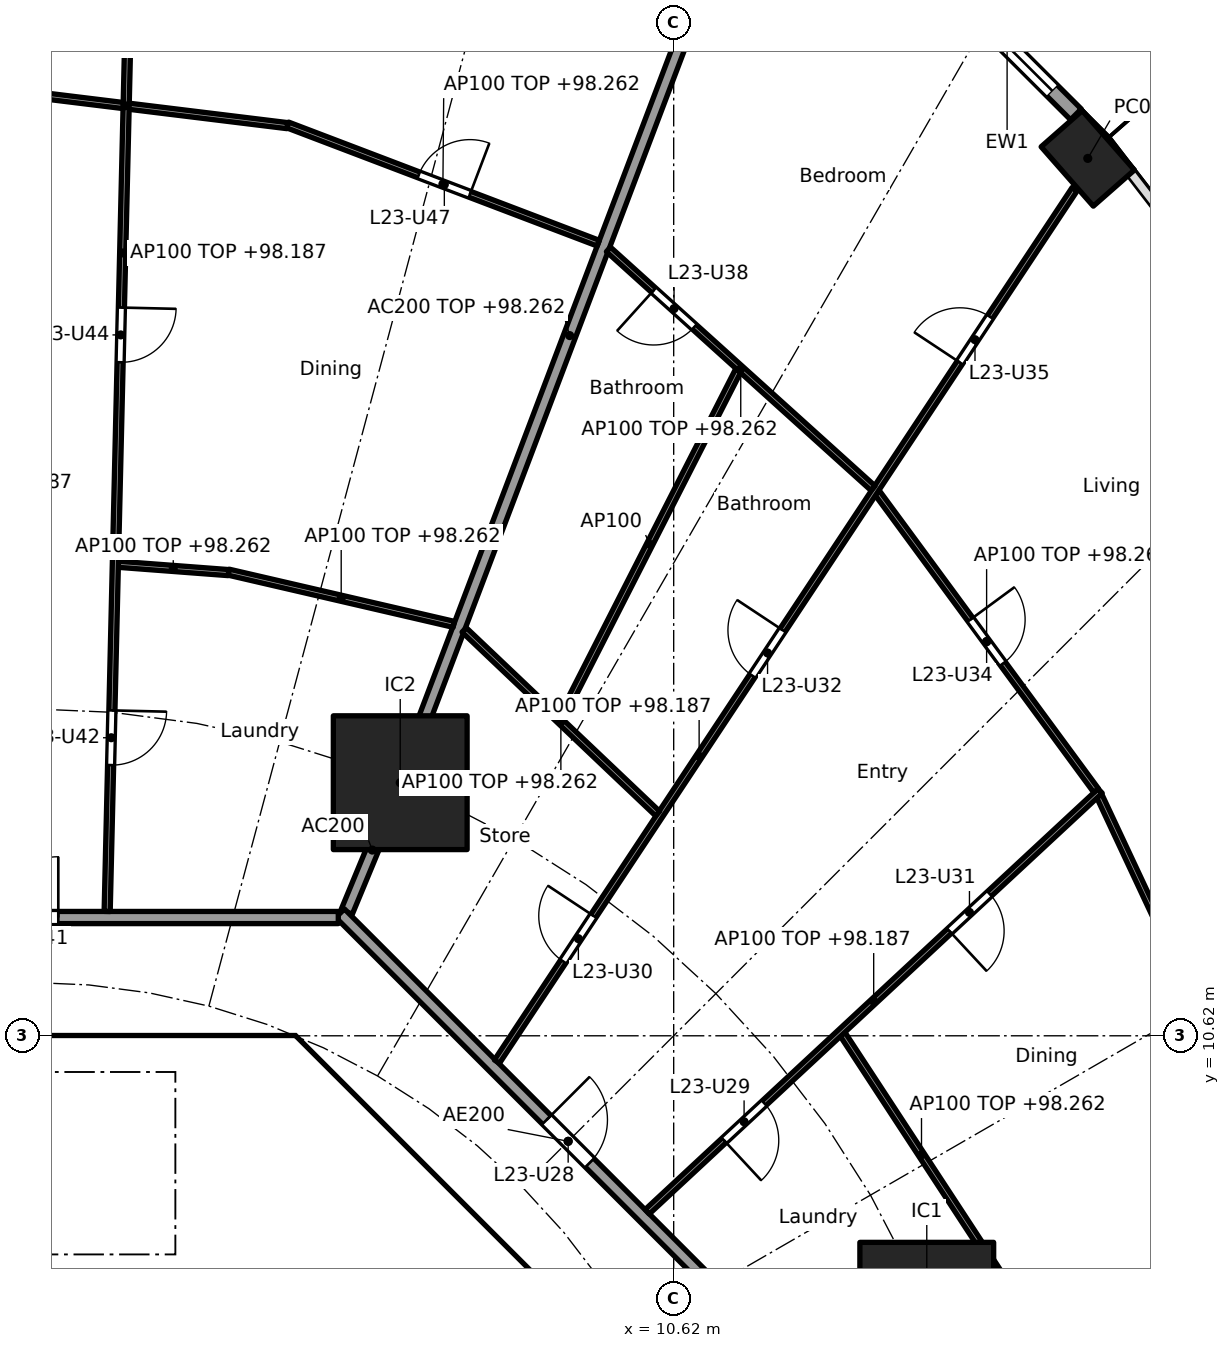
"""IFC4 building model, lengths in metres.
Left out: names, types, materials, properties, quantities, classifications, styles, units other than length and angle.
Written with IfcOpenShell. Run it as: python <this file> out.ifc"""

import sys

from ifc_helpers import new_model, si_unit, direction, frame, frame_2d, origin, origin_2d, place, context, subcontext, project, spatial, polyline, rectangle, hollow_rectangle, outline, extrude, element, fill, save


model = new_model("IFC4")
c1 = context("Model", 3, precision=1e-05, world=origin(), true_north=direction((0.0, 1.0)))
c2 = subcontext(c1, "Body", "Model", "MODEL_VIEW")
j1 = project(units=[si_unit("LENGTHUNIT", "METRE"), si_unit("PLANEANGLEUNIT", "RADIAN")], contexts=[c1])
p1 = place(None, origin())
s1 = spatial("IfcSite", under=j1, at=p1, CompositionType="ELEMENT")
p2 = place(p1, origin())
s2 = spatial("IfcBuilding", under=s1, at=p2, CompositionType="ELEMENT")
p3 = place(p2, frame((0.0, 0.0, 95.5)))
s3 = spatial("IfcBuildingStorey", under=s2, at=p3, CompositionType="ELEMENT", Elevation=95.5)
p4 = place(p3, frame((17.43, 25.049, 0.0), z_axis=(0.0, 0.0, 1.0), x_axis=(-0.660114607735, 0.751164898445, 0.0)))
e1 = element("IfcColumn", 1, at=p4, inside=s3, PredefinedType="COLUMN", context=c2, shape_type="SweptSolid", body=[
    extrude(hollow_rectangle(XDim=1.3, YDim=0.9, WallThickness=0.045, at=origin_2d()), origin(), (0.0, 0.0, 1.0), 3.7),
])
for number, where, z_axis, x_axis in (
    (2, (14.782, 6.123, 0.0), (0.0, 0.0, 1.0), (1.0, 0.0, 0.0)),
    (3, (6.123, 14.782, 0.0), (0.0, 0.0, 1.0), (1.0, 0.0, 0.0)),
):
    element("IfcColumn", number, at=place(p3, frame(where, z_axis=z_axis, x_axis=x_axis)), inside=s3, PredefinedType="COLUMN", context=c2, shape_type="SweptSolid", body=[
        extrude(rectangle(XDim=2.2, YDim=2.2, at=origin_2d()), origin(), (0.0, 0.0, 1.0), 3.7),
    ])
p5 = place(p3, frame((14.971, 28.032, 0.0), z_axis=(0.0, 0.0, 1.0), x_axis=(0.707793551437, -0.706419343269, 0.0)))
e4 = element("IfcWall", 4, at=p5, inside=s3, PredefinedType="SOLIDWALL", context=c2, shape_type="SweptSolid", body=[
    extrude(rectangle(XDim=3.198, YDim=0.25, at=frame_2d((1.599, 0.0))), origin(), (0.0, 0.0, 1.0), 3.44),
])
p6 = place(p5, frame((0.549, 0.0, 0.0)))
e5 = element("IfcOpeningElement", 5, at=p6, cuts=e4, PredefinedType="OPENING", context=c2, shape_type="SweptSolid", body=[
    extrude(rectangle(XDim=2.1, YDim=2.4, at=frame_2d((1.05, 1.2))), frame((0.0, 0.135, 0.0), z_axis=(0.0, -1.0, 0.0), x_axis=(1.0, 0.0, 0.0)), (0.0, 0.0, 1.0), 0.27),
])
p7 = place(p3, frame((9.988, 4.613, 0.0), z_axis=(0.0, 0.0, 1.0), x_axis=(-0.707106781187, 0.707106781187, 0.0)))
e6 = element("IfcWall", 6, at=p7, inside=s3, PredefinedType="SHEAR", context=c2, shape_type="SweptSolid", body=[
    extrude(rectangle(XDim=7.602, YDim=0.6, at=frame_2d((3.801, 0.0))), origin(), (0.0, 0.0, 1.0), 3.44),
])
p8 = place(p7, frame((3.201, 0.0, 0.0)))
e7 = element("IfcOpeningElement", 7, at=p8, cuts=e6, PredefinedType="OPENING", context=c2, shape_type="SweptSolid", body=[
    extrude(rectangle(XDim=1.2, YDim=2.1, at=frame_2d((0.6, 1.05))), frame((0.0, 0.31, 0.0), z_axis=(0.0, -1.0, 0.0), x_axis=(1.0, 0.0, 0.0)), (0.0, 0.0, 1.0), 0.62),
])
p9 = place(p3, frame((4.0, 7.025, 0.0), z_axis=(0.0, 0.0, 1.0), x_axis=(0.0, 1.0, 0.0)))
e8 = element("IfcWall", 8, at=p9, inside=s3, PredefinedType="SOLIDWALL", context=c2, shape_type="SweptSolid", body=[
    extrude(rectangle(XDim=3.0, YDim=0.2, at=frame_2d((1.5, 0.0))), origin(), (0.0, 0.0, 1.0), 3.44),
])
p10 = place(p9, frame((0.925, 0.0, 0.0)))
e9 = element("IfcOpeningElement", 9, at=p10, cuts=e8, PredefinedType="OPENING", context=c2, shape_type="SweptSolid", body=[
    extrude(rectangle(XDim=1.1, YDim=2.1, at=frame_2d((0.55, 1.05))), frame((0.0, 0.11, 0.0), z_axis=(0.0, -1.0, 0.0), x_axis=(1.0, 0.0, 0.0)), (0.0, 0.0, 1.0), 0.22),
])
p11 = place(p3, origin())
e10 = element("IfcWall", 10, at=p11, inside=s3, PredefinedType="SHEAR", context=c2, shape_type="SweptSolid", body=[
    extrude(outline(polyline([(-4.152, 10.025), (-4.401, 9.776), (-4.825, 10.2), (-4.401, 10.625), (4.401, 10.625), (4.825, 10.2), (4.401, 9.776), (4.152, 10.025), (-4.152, 10.025)])), origin(), (0.0, 0.0, 1.0), 3.44),
])
p12 = place(p3, origin())
e11 = element("IfcWall", 11, at=p12, inside=s3, PredefinedType="SOLIDWALL", context=c2, shape_type="SweptSolid", body=[
    extrude(outline(polyline([(4.1, 6.5), (-4.1, 6.5), (-4.1, 7.025), (4.1, 7.025), (4.1, 6.5)])), origin(), (0.0, 0.0, 1.0), 3.44),
])
p13 = place(p3, frame((5.243, 12.657, 0.0), z_axis=(0.0, 0.0, 1.0), x_axis=(0.382724096228, 0.923862687939, 0.0)))
e12 = element("IfcWall", 12, at=p13, inside=s3, PredefinedType="PARTITIONING", context=c2, shape_type="SweptSolid", body=[
    extrude(rectangle(XDim=2.201, YDim=0.2, at=frame_2d((1.1, 0.0))), origin(), (0.0, 0.0, 1.0), 3.44),
])
p14 = place(p3, frame((6.141, 14.829, 0.0), z_axis=(0.0, 0.0, 1.0), x_axis=(0.354477134193, 0.935064682968, 0.0)))
e13 = element("IfcWall", 13, at=p14, inside=s3, PredefinedType="PARTITIONING", context=c2, shape_type="SweptSolid", body=[
    extrude(rectangle(XDim=15.626, YDim=0.2, at=frame_2d((7.813, 0.0))), origin(), (0.0, 0.0, 1.0), 2.762),
])
p15 = place(p3, frame((12.635, 5.134, 0.0), z_axis=(0.0, 0.0, 1.0), x_axis=(-0.707106781187, 0.707106781187, 0.0)))
e14 = element("IfcWall", 14, at=p15, inside=s3, PredefinedType="PARTITIONING", context=c2, shape_type="SweptSolid", body=[
    extrude(rectangle(XDim=10.609, YDim=0.2, at=frame_2d((5.305, 0.0))), origin(), (0.0, 0.0, 1.0), 3.44),
])
p16 = place(p15, frame((4.804, 0.0, 0.0)))
e15 = element("IfcOpeningElement", 15, at=p16, cuts=e14, PredefinedType="OPENING", context=c2, shape_type="SweptSolid", body=[
    extrude(rectangle(XDim=1.0, YDim=2.1, at=frame_2d((0.5, 1.05))), frame((0.0, 0.11, 0.0), z_axis=(0.0, -1.0, 0.0), x_axis=(1.0, 0.0, 0.0)), (0.0, 0.0, 1.0), 0.22),
])
p17 = place(p3, frame((5.104, 12.565, 0.0), z_axis=(0.0, 0.0, 1.0), x_axis=(-1.0, 0.0, 0.0)))
e16 = element("IfcWall", 16, at=p17, inside=s3, PredefinedType="PARTITIONING", context=c2, shape_type="SweptSolid", body=[
    extrude(rectangle(XDim=10.409, YDim=0.2, at=frame_2d((5.205, 0.0))), origin(), (0.0, 0.0, 1.0), 3.44),
])
p18 = place(p17, frame((4.604, 0.0, 0.0)))
e17 = element("IfcOpeningElement", 17, at=p18, cuts=e16, PredefinedType="OPENING", context=c2, shape_type="SweptSolid", body=[
    extrude(rectangle(XDim=1.0, YDim=2.1, at=frame_2d((0.5, 1.05))), frame((0.0, 0.11, 0.0), z_axis=(0.0, -1.0, 0.0), x_axis=(1.0, 0.0, 0.0)), (0.0, 0.0, 1.0), 0.22),
])
p19 = place(p3, frame((15.992, 6.68, 0.0), z_axis=(0.0, 0.0, 1.0), x_axis=(-0.547472878942, 0.836823426311, 0.0)))
e18 = element("IfcWall", 18, at=p19, inside=s3, PredefinedType="PARTITIONING", context=c2, shape_type="SweptSolid", body=[
    extrude(rectangle(XDim=4.738, YDim=0.1, at=frame_2d((2.369, 0.0))), origin(), (0.0, 0.0, 1.0), 2.762),
])
p20 = place(p3, frame((20.252, 8.95, 0.0), z_axis=(0.0, 0.0, 1.0), x_axis=(-0.424580052627, 0.90539040138, 0.0)))
e19 = element("IfcWall", 19, at=p20, inside=s3, PredefinedType="PARTITIONING", context=c2, shape_type="SweptSolid", body=[
    extrude(rectangle(XDim=6.204, YDim=0.1, at=frame_2d((3.102, 0.0))), origin(), (0.0, 0.0, 1.0), 2.762),
])
p21 = place(p3, frame((10.185, 7.726, 0.0), z_axis=(0.0, 0.0, 1.0), x_axis=(0.732598472978, 0.680661059112, 0.0)))
e20 = element("IfcWall", 20, at=p21, inside=s3, PredefinedType="PARTITIONING", context=c2, shape_type="SweptSolid", body=[
    extrude(rectangle(XDim=10.167, YDim=0.1, at=frame_2d((5.084, 0.0))), origin(), (0.0, 0.0, 1.0), 2.687),
])
p22 = place(p21, frame((1.725, 0.0, 0.0)))
e21 = element("IfcOpeningElement", 21, at=p22, cuts=e20, PredefinedType="OPENING", context=c2, shape_type="SweptSolid", body=[
    extrude(rectangle(XDim=0.9, YDim=2.1, at=frame_2d((0.45, 1.05))), frame((0.0, 0.06, 0.0), z_axis=(0.0, -1.0, 0.0), x_axis=(1.0, 0.0, 0.0)), (0.0, 0.0, 1.0), 0.12),
])
p23 = place(p21, frame((6.784, 0.0, 0.0)))
e22 = element("IfcOpeningElement", 22, at=p23, cuts=e20, PredefinedType="OPENING", context=c2, shape_type="SweptSolid", body=[
    extrude(rectangle(XDim=0.9, YDim=2.1, at=frame_2d((0.45, 1.05))), frame((0.0, 0.06, 0.0), z_axis=(0.0, -1.0, 0.0), x_axis=(1.0, 0.0, 0.0)), (0.0, 0.0, 1.0), 0.12),
])
p24 = place(p3, frame((17.567, 14.653, 0.0), z_axis=(0.0, 0.0, 1.0), x_axis=(-0.592391983588, 0.80564988536, 0.0)))
e23 = element("IfcWall", 23, at=p24, inside=s3, PredefinedType="PARTITIONING", context=c2, shape_type="SweptSolid", body=[
    extrude(rectangle(XDim=6.08, YDim=0.1, at=frame_2d((3.04, 0.0))), origin(), (0.0, 0.0, 1.0), 2.762),
])
p25 = place(p24, frame((2.59, 0.0, 0.0)))
e24 = element("IfcOpeningElement", 24, at=p25, cuts=e23, PredefinedType="OPENING", context=c2, shape_type="SweptSolid", body=[
    extrude(rectangle(XDim=0.9, YDim=2.1, at=frame_2d((0.45, 1.05))), frame((0.0, 0.06, 0.0), z_axis=(0.0, -1.0, 0.0), x_axis=(1.0, 0.0, 0.0)), (0.0, 0.0, 1.0), 0.12),
])
p26 = place(p3, frame((7.713, 10.195, 0.0), z_axis=(0.0, 0.0, 1.0), x_axis=(0.552111071171, 0.833770571015, 0.0)))
e25 = element("IfcWall", 25, at=p26, inside=s3, PredefinedType="PARTITIONING", context=c2, shape_type="SweptSolid", body=[
    extrude(rectangle(XDim=17.208, YDim=0.1, at=frame_2d((8.604, 0.0))), origin(), (0.0, 0.0, 1.0), 2.687),
])
p27 = place(p26, frame((1.976, 0.0, 0.0)))
e26 = element("IfcOpeningElement", 26, at=p27, cuts=e25, PredefinedType="OPENING", context=c2, shape_type="SweptSolid", body=[
    extrude(rectangle(XDim=0.9, YDim=2.1, at=frame_2d((0.45, 1.05))), frame((0.0, 0.06, 0.0), z_axis=(0.0, -1.0, 0.0), x_axis=(1.0, 0.0, 0.0)), (0.0, 0.0, 1.0), 0.12),
])
p28 = place(p26, frame((7.611, 0.0, 0.0)))
e27 = element("IfcOpeningElement", 27, at=p28, cuts=e25, PredefinedType="OPENING", context=c2, shape_type="SweptSolid", body=[
    extrude(rectangle(XDim=0.9, YDim=2.1, at=frame_2d((0.45, 1.05))), frame((0.0, 0.06, 0.0), z_axis=(0.0, -1.0, 0.0), x_axis=(1.0, 0.0, 0.0)), (0.0, 0.0, 1.0), 0.12),
])
p29 = place(p26, frame((13.79, 0.0, 0.0)))
e28 = element("IfcOpeningElement", 28, at=p29, cuts=e25, PredefinedType="OPENING", context=c2, shape_type="SweptSolid", body=[
    extrude(rectangle(XDim=0.9, YDim=2.1, at=frame_2d((0.45, 1.05))), frame((0.0, 0.06, 0.0), z_axis=(0.0, -1.0, 0.0), x_axis=(1.0, 0.0, 0.0)), (0.0, 0.0, 1.0), 0.12),
])
p30 = place(p3, frame((10.355, 14.274, 0.0), z_axis=(0.0, 0.0, 1.0), x_axis=(-0.725206433622, 0.688531501555, 0.0)))
e29 = element("IfcWall", 29, at=p30, inside=s3, PredefinedType="PARTITIONING", context=c2, shape_type="SweptSolid", body=[
    extrude(rectangle(XDim=4.387, YDim=0.1, at=frame_2d((2.193, 0.0))), origin(), (0.0, 0.0, 1.0), 2.762),
])
p31 = place(p3, frame((13.898, 19.625, 0.0), z_axis=(0.0, 0.0, 1.0), x_axis=(-0.742396654702, 0.669960601146, 0.0)))
e30 = element("IfcWall", 30, at=p31, inside=s3, PredefinedType="PARTITIONING", context=c2, shape_type="SweptSolid", body=[
    extrude(rectangle(XDim=5.861, YDim=0.1, at=frame_2d((2.931, 0.0))), origin(), (0.0, 0.0, 1.0), 2.762),
])
p32 = place(p31, frame((3.958, 0.0, 0.0)))
e31 = element("IfcOpeningElement", 31, at=p32, cuts=e30, PredefinedType="OPENING", context=c2, shape_type="SweptSolid", body=[
    extrude(rectangle(XDim=0.9, YDim=2.1, at=frame_2d((0.45, 1.05))), frame((0.0, 0.06, 0.0), z_axis=(0.0, -1.0, 0.0), x_axis=(1.0, 0.0, 0.0)), (0.0, 0.0, 1.0), 0.12),
])
p33 = place(p3, frame((8.769, 15.846, 0.0), z_axis=(0.0, 0.0, 1.0), x_axis=(0.454067187552, 0.890967445639, 0.0)))
e32 = element("IfcWall", 32, at=p33, inside=s3, PredefinedType="PARTITIONING", context=c2, shape_type="SweptSolid", body=[
    extrude(rectangle(XDim=6.414, YDim=0.1, at=frame_2d((3.207, 0.0))), origin(), (0.0, 0.0, 1.0), 3.44),
])
p34 = place(p3, frame((7.004, 17.386, 0.0), z_axis=(0.0, 0.0, 1.0), x_axis=(-0.974179728512, 0.225773905837, 0.0)))
e33 = element("IfcWall", 33, at=p34, inside=s3, PredefinedType="PARTITIONING", context=c2, shape_type="SweptSolid", body=[
    extrude(rectangle(XDim=3.802, YDim=0.1, at=frame_2d((1.901, 0.0))), origin(), (0.0, 0.0, 1.0), 2.762),
])
p35 = place(p3, frame((9.379, 23.655, 0.0), z_axis=(0.0, 0.0, 1.0), x_axis=(-0.934609369022, 0.355675873986, 0.0)))
e34 = element("IfcWall", 34, at=p35, inside=s3, PredefinedType="PARTITIONING", context=c2, shape_type="SweptSolid", body=[
    extrude(rectangle(XDim=5.467, YDim=0.1, at=frame_2d((2.733, 0.0))), origin(), (0.0, 0.0, 1.0), 2.762),
])
p36 = place(p35, frame((2.258, 0.0, 0.0)))
e35 = element("IfcOpeningElement", 35, at=p36, cuts=e34, PredefinedType="OPENING", context=c2, shape_type="SweptSolid", body=[
    extrude(rectangle(XDim=0.9, YDim=2.1, at=frame_2d((0.45, 1.05))), frame((0.0, 0.06, 0.0), z_axis=(0.0, -1.0, 0.0), x_axis=(1.0, 0.0, 0.0)), (0.0, 0.0, 1.0), 0.12),
])
p37 = place(p3, frame((3.299, 18.237, 0.0), z_axis=(0.0, 0.0, 1.0), x_axis=(-0.997152920483, 0.075405922664, 0.0)))
e36 = element("IfcWall", 36, at=p37, inside=s3, PredefinedType="PARTITIONING", context=c2, shape_type="SweptSolid", body=[
    extrude(rectangle(XDim=1.823, YDim=0.1, at=frame_2d((0.911, 0.0))), origin(), (0.0, 0.0, 1.0), 2.762),
])
p38 = place(p3, frame((4.267, 25.587, 0.0), z_axis=(0.0, 0.0, 1.0), x_axis=(-0.992576206119, 0.121624319302, 0.0)))
e37 = element("IfcWall", 37, at=p38, inside=s3, PredefinedType="PARTITIONING", context=c2, shape_type="SweptSolid", body=[
    extrude(rectangle(XDim=5.374, YDim=0.1, at=frame_2d((2.687, 0.0))), origin(), (0.0, 0.0, 1.0), 2.762),
])
p39 = place(p3, frame((1.303, 12.665, 0.0), z_axis=(0.0, 0.0, 1.0), x_axis=(0.023564110689, 0.999722327793, 0.0)))
e38 = element("IfcWall", 38, at=p39, inside=s3, PredefinedType="PARTITIONING", context=c2, shape_type="SweptSolid", body=[
    extrude(rectangle(XDim=21.664, YDim=0.1, at=frame_2d((10.832, 0.0))), origin(), (0.0, 0.0, 1.0), 2.687),
])
p40 = place(p39, frame((2.407, 0.0, 0.0)))
e39 = element("IfcOpeningElement", 39, at=p40, cuts=e38, PredefinedType="OPENING", context=c2, shape_type="SweptSolid", body=[
    extrude(rectangle(XDim=0.9, YDim=2.1, at=frame_2d((0.45, 1.05))), frame((0.0, 0.06, 0.0), z_axis=(0.0, -1.0, 0.0), x_axis=(1.0, 0.0, 0.0)), (0.0, 0.0, 1.0), 0.12),
])
p41 = place(p39, frame((9.034, 0.0, 0.0)))
e40 = element("IfcOpeningElement", 40, at=p41, cuts=e38, PredefinedType="OPENING", context=c2, shape_type="SweptSolid", body=[
    extrude(rectangle(XDim=0.9, YDim=2.1, at=frame_2d((0.45, 1.05))), frame((0.0, 0.06, 0.0), z_axis=(0.0, -1.0, 0.0), x_axis=(1.0, 0.0, 0.0)), (0.0, 0.0, 1.0), 0.12),
])
p42 = place(p39, frame((17.009, 0.0, 0.0)))
e41 = element("IfcOpeningElement", 41, at=p42, cuts=e38, PredefinedType="OPENING", context=c2, shape_type="SweptSolid", body=[
    extrude(rectangle(XDim=0.9, YDim=2.1, at=frame_2d((0.45, 1.05))), frame((0.0, 0.06, 0.0), z_axis=(0.0, -1.0, 0.0), x_axis=(1.0, 0.0, 0.0)), (0.0, 0.0, 1.0), 0.12),
])
p43 = place(p6, origin())
e42 = element("IfcDoor", 42, at=p43, inside=s3, OperationType="SLIDING_TO_LEFT", PredefinedType="DOOR", context=c2, shape_type="SweptSolid", body=[
    extrude(rectangle(XDim=2.1, YDim=2.4, at=frame_2d((1.05, 1.2))), frame((0.0, 0.025, 0.0), z_axis=(0.0, -1.0, 0.0), x_axis=(1.0, 0.0, 0.0)), (0.0, 0.0, 1.0), 0.05),
])
fill(e5, e42)
p44 = place(p10, origin())
e43 = element("IfcDoor", 43, at=p44, inside=s3, OperationType="SINGLE_SWING_RIGHT", PredefinedType="DOOR", context=c2, shape_type="SweptSolid", body=[
    extrude(rectangle(XDim=1.1, YDim=2.1, at=frame_2d((0.55, 1.05))), frame((0.0, 0.025, 0.0), z_axis=(0.0, -1.0, 0.0), x_axis=(1.0, 0.0, 0.0)), (0.0, 0.0, 1.0), 0.05),
])
fill(e9, e43)
p45 = place(p8, origin())
e44 = element("IfcDoor", 44, at=p45, inside=s3, OperationType="SINGLE_SWING_RIGHT", PredefinedType="DOOR", context=c2, shape_type="SweptSolid", body=[
    extrude(rectangle(XDim=1.2, YDim=2.1, at=frame_2d((0.6, 1.05))), frame((0.0, 0.025, 0.0), z_axis=(0.0, -1.0, 0.0), x_axis=(1.0, 0.0, 0.0)), (0.0, 0.0, 1.0), 0.05),
])
fill(e7, e44)
p46 = place(p16, frame((1.0, 0.0, 0.0), x_axis=(-1.0, 0.0, 0.0)))
e45 = element("IfcDoor", 45, at=p46, inside=s3, OperationType="SINGLE_SWING_LEFT", PredefinedType="DOOR", context=c2, shape_type="SweptSolid", body=[
    extrude(rectangle(XDim=1.0, YDim=2.1, at=frame_2d((0.5, 1.05))), frame((0.0, 0.025, 0.0), z_axis=(0.0, -1.0, 0.0), x_axis=(1.0, 0.0, 0.0)), (0.0, 0.0, 1.0), 0.05),
])
fill(e15, e45)
p47 = place(p22, frame((0.9, 0.0, 0.0), x_axis=(-1.0, 0.0, 0.0)))
e46 = element("IfcDoor", 46, at=p47, inside=s3, OperationType="SINGLE_SWING_RIGHT", PredefinedType="DOOR", context=c2, shape_type="SweptSolid", body=[
    extrude(rectangle(XDim=0.9, YDim=2.1, at=frame_2d((0.45, 1.05))), frame((0.0, 0.025, 0.0), z_axis=(0.0, -1.0, 0.0), x_axis=(1.0, 0.0, 0.0)), (0.0, 0.0, 1.0), 0.05),
])
fill(e21, e46)
p48 = place(p27, origin())
e47 = element("IfcDoor", 47, at=p48, inside=s3, OperationType="SINGLE_SWING_RIGHT", PredefinedType="DOOR", context=c2, shape_type="SweptSolid", body=[
    extrude(rectangle(XDim=0.9, YDim=2.1, at=frame_2d((0.45, 1.05))), frame((0.0, 0.025, 0.0), z_axis=(0.0, -1.0, 0.0), x_axis=(1.0, 0.0, 0.0)), (0.0, 0.0, 1.0), 0.05),
])
fill(e26, e47)
p49 = place(p23, frame((0.9, 0.0, 0.0), x_axis=(-1.0, 0.0, 0.0)))
e48 = element("IfcDoor", 48, at=p49, inside=s3, OperationType="SINGLE_SWING_RIGHT", PredefinedType="DOOR", context=c2, shape_type="SweptSolid", body=[
    extrude(rectangle(XDim=0.9, YDim=2.1, at=frame_2d((0.45, 1.05))), frame((0.0, 0.025, 0.0), z_axis=(0.0, -1.0, 0.0), x_axis=(1.0, 0.0, 0.0)), (0.0, 0.0, 1.0), 0.05),
])
fill(e22, e48)
p50 = place(p28, origin())
e49 = element("IfcDoor", 49, at=p50, inside=s3, OperationType="SINGLE_SWING_RIGHT", PredefinedType="DOOR", context=c2, shape_type="SweptSolid", body=[
    extrude(rectangle(XDim=0.9, YDim=2.1, at=frame_2d((0.45, 1.05))), frame((0.0, 0.025, 0.0), z_axis=(0.0, -1.0, 0.0), x_axis=(1.0, 0.0, 0.0)), (0.0, 0.0, 1.0), 0.05),
])
fill(e27, e49)
p51 = place(p25, frame((0.9, 0.0, 0.0), x_axis=(-1.0, 0.0, 0.0)))
e50 = element("IfcDoor", 50, at=p51, inside=s3, OperationType="SINGLE_SWING_LEFT", PredefinedType="DOOR", context=c2, shape_type="SweptSolid", body=[
    extrude(rectangle(XDim=0.9, YDim=2.1, at=frame_2d((0.45, 1.05))), frame((0.0, 0.025, 0.0), z_axis=(0.0, -1.0, 0.0), x_axis=(1.0, 0.0, 0.0)), (0.0, 0.0, 1.0), 0.05),
])
fill(e24, e50)
p52 = place(p29, origin())
e51 = element("IfcDoor", 51, at=p52, inside=s3, OperationType="SINGLE_SWING_LEFT", PredefinedType="DOOR", context=c2, shape_type="SweptSolid", body=[
    extrude(rectangle(XDim=0.9, YDim=2.1, at=frame_2d((0.45, 1.05))), frame((0.0, 0.025, 0.0), z_axis=(0.0, -1.0, 0.0), x_axis=(1.0, 0.0, 0.0)), (0.0, 0.0, 1.0), 0.05),
])
fill(e28, e51)
p53 = place(p32, origin())
e52 = element("IfcDoor", 52, at=p53, inside=s3, OperationType="SINGLE_SWING_RIGHT", PredefinedType="DOOR", context=c2, shape_type="SweptSolid", body=[
    extrude(rectangle(XDim=0.9, YDim=2.1, at=frame_2d((0.45, 1.05))), frame((0.0, 0.025, 0.0), z_axis=(0.0, -1.0, 0.0), x_axis=(1.0, 0.0, 0.0)), (0.0, 0.0, 1.0), 0.05),
])
fill(e31, e52)
p54 = place(p18, frame((1.0, 0.0, 0.0), x_axis=(-1.0, 0.0, 0.0)))
e53 = element("IfcDoor", 53, at=p54, inside=s3, OperationType="SINGLE_SWING_RIGHT", PredefinedType="DOOR", context=c2, shape_type="SweptSolid", body=[
    extrude(rectangle(XDim=1.0, YDim=2.1, at=frame_2d((0.5, 1.05))), frame((0.0, 0.025, 0.0), z_axis=(0.0, -1.0, 0.0), x_axis=(1.0, 0.0, 0.0)), (0.0, 0.0, 1.0), 0.05),
])
fill(e17, e53)
p55 = place(p40, frame((0.9, 0.0, 0.0), x_axis=(-1.0, 0.0, 0.0)))
e54 = element("IfcDoor", 54, at=p55, inside=s3, OperationType="SINGLE_SWING_LEFT", PredefinedType="DOOR", context=c2, shape_type="SweptSolid", body=[
    extrude(rectangle(XDim=0.9, YDim=2.1, at=frame_2d((0.45, 1.05))), frame((0.0, 0.025, 0.0), z_axis=(0.0, -1.0, 0.0), x_axis=(1.0, 0.0, 0.0)), (0.0, 0.0, 1.0), 0.05),
])
fill(e39, e54)
p56 = place(p41, frame((0.9, 0.0, 0.0), x_axis=(-1.0, 0.0, 0.0)))
e55 = element("IfcDoor", 55, at=p56, inside=s3, OperationType="SINGLE_SWING_LEFT", PredefinedType="DOOR", context=c2, shape_type="SweptSolid", body=[
    extrude(rectangle(XDim=0.9, YDim=2.1, at=frame_2d((0.45, 1.05))), frame((0.0, 0.025, 0.0), z_axis=(0.0, -1.0, 0.0), x_axis=(1.0, 0.0, 0.0)), (0.0, 0.0, 1.0), 0.05),
])
fill(e40, e55)
p57 = place(p36, frame((0.9, 0.0, 0.0), x_axis=(-1.0, 0.0, 0.0)))
e56 = element("IfcDoor", 56, at=p57, inside=s3, OperationType="SINGLE_SWING_RIGHT", PredefinedType="DOOR", context=c2, shape_type="SweptSolid", body=[
    extrude(rectangle(XDim=0.9, YDim=2.1, at=frame_2d((0.45, 1.05))), frame((0.0, 0.025, 0.0), z_axis=(0.0, -1.0, 0.0), x_axis=(1.0, 0.0, 0.0)), (0.0, 0.0, 1.0), 0.05),
])
fill(e35, e56)
save(model, sys.argv[1])
